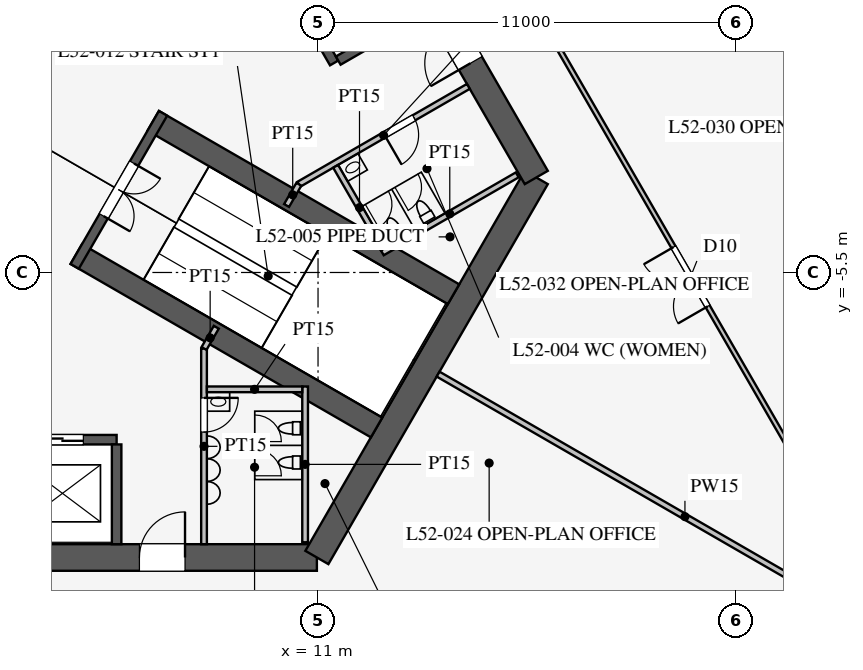
"""IFC4 building model, lengths in metres.
Left out: names, types, materials, properties, quantities, classifications, styles, units other than length and angle.
Written with IfcOpenShell. Run it as: python <this file> out.ifc"""

import sys

from ifc_helpers import new_model, si_unit, direction, frame, frame_2d, origin, place, context, subcontext, project, spatial, rectangle, extrude, element, fill, save


model = new_model("IFC4")
c1 = context("Model", 3, precision=1e-05, world=origin(), true_north=direction((0.0, 1.0)))
c2 = subcontext(c1, "Body", "Model", "MODEL_VIEW")
j1 = project(units=[si_unit("LENGTHUNIT", "METRE"), si_unit("PLANEANGLEUNIT", "RADIAN")], contexts=[c1])
p1 = place(None, origin())
s1 = spatial("IfcSite", under=j1, at=p1, CompositionType="ELEMENT")
p2 = place(p1, origin())
s2 = spatial("IfcBuilding", under=s1, at=p2, CompositionType="ELEMENT")
p3 = place(p2, frame((0.0, 0.0, 227.5)))
s3 = spatial("IfcBuildingStorey", under=s2, at=p3, CompositionType="ELEMENT", Elevation=227.5)
p4 = place(p3, frame((-10.97, -13.0, 0.0), z_axis=(0.0, 0.0, 1.0), x_axis=(1.0, 0.0, 0.0)))
e1 = element("IfcWall", 1, at=p4, inside=s3, PredefinedType="SHEAR", context=c2, shape_type="SweptSolid", body=[
    extrude(rectangle(XDim=21.939, YDim=0.7, at=frame_2d((10.97, 0.0))), origin(), (0.0, 0.0, 1.0), 4.2),
])
p5 = place(p4, frame((17.27, 0.0, 0.0)))
e2 = element("IfcOpeningElement", 2, at=p5, cuts=e1, PredefinedType="OPENING", context=c2, shape_type="SweptSolid", body=[
    extrude(rectangle(XDim=1.2, YDim=2.1, at=frame_2d((0.6, 1.05))), frame((0.0, 0.36, 0.0), z_axis=(0.0, -1.0, 0.0), x_axis=(1.0, 0.0, 0.0)), (0.0, 0.0, 1.0), 0.72),
])
p6 = place(p4, frame((3.47, 0.0, 0.0)))
e3 = element("IfcOpeningElement", 3, at=p6, cuts=e1, PredefinedType="OPENING", context=c2, shape_type="SweptSolid", body=[
    extrude(rectangle(XDim=1.2, YDim=2.1, at=frame_2d((0.6, 1.05))), frame((0.0, 0.36, 0.0), z_axis=(0.0, -1.0, 0.0), x_axis=(1.0, 0.0, 0.0)), (0.0, 0.0, 1.0), 0.72),
])
p7 = place(p3, frame((10.97, -13.0, 0.0), z_axis=(0.0, 0.0, 1.0), x_axis=(0.499995765644, 0.866027848477, 0.0)))
e4 = element("IfcWall", 4, at=p7, inside=s3, PredefinedType="SHEAR", context=c2, shape_type="SweptSolid", body=[
    extrude(rectangle(XDim=11.547, YDim=0.7, at=frame_2d((5.773, 0.0))), origin(), (0.0, 0.0, 1.0), 4.2),
])
p8 = place(p3, frame((16.743, -3.0, 0.0), z_axis=(0.0, 0.0, 1.0), x_axis=(-0.500002442456, 0.866023993627, 0.0)))
e5 = element("IfcWall", 5, at=p8, inside=s3, PredefinedType="SHEAR", context=c2, shape_type="SweptSolid", body=[
    extrude(rectangle(XDim=21.939, YDim=0.7, at=frame_2d((10.97, 0.0))), origin(), (0.0, 0.0, 1.0), 4.2),
])
p9 = place(p8, frame((17.27, 0.0, 0.0)))
e6 = element("IfcOpeningElement", 6, at=p9, cuts=e5, PredefinedType="OPENING", context=c2, shape_type="SweptSolid", body=[
    extrude(rectangle(XDim=1.2, YDim=2.1, at=frame_2d((0.6, 1.05))), frame((0.0, 0.36, 0.0), z_axis=(0.0, -1.0, 0.0), x_axis=(1.0, 0.0, 0.0)), (0.0, 0.0, 1.0), 0.72),
])
p10 = place(p8, frame((3.47, 0.0, 0.0)))
e7 = element("IfcOpeningElement", 7, at=p10, cuts=e5, PredefinedType="OPENING", context=c2, shape_type="SweptSolid", body=[
    extrude(rectangle(XDim=1.2, YDim=2.1, at=frame_2d((0.6, 1.05))), frame((0.0, 0.36, 0.0), z_axis=(0.0, -1.0, 0.0), x_axis=(1.0, 0.0, 0.0)), (0.0, 0.0, 1.0), 0.72),
])
p11 = place(p3, frame((-5.7, -9.9, 0.0), z_axis=(0.0, 0.0, 1.0), x_axis=(1.0, 0.0, 0.0)))
e8 = element("IfcWall", 8, at=p11, inside=s3, PredefinedType="SHEAR", context=c2, shape_type="SweptSolid", body=[
    extrude(rectangle(XDim=11.4, YDim=0.25, at=frame_2d((5.7, 0.0))), origin(), (0.0, 0.0, 1.0), 4.2),
])
p12 = place(p11, frame((0.875, 0.0, 0.0)))
e9 = element("IfcOpeningElement", 9, at=p12, cuts=e8, PredefinedType="OPENING", context=c2, shape_type="SweptSolid", body=[
    extrude(rectangle(XDim=1.1, YDim=2.2, at=frame_2d((0.55, 1.1))), frame((0.0, 0.135, 0.0), z_axis=(0.0, -1.0, 0.0), x_axis=(1.0, 0.0, 0.0)), (0.0, 0.0, 1.0), 0.27),
])
p13 = place(p11, frame((3.725, 0.0, 0.0)))
e10 = element("IfcOpeningElement", 10, at=p13, cuts=e8, PredefinedType="OPENING", context=c2, shape_type="SweptSolid", body=[
    extrude(rectangle(XDim=1.1, YDim=2.2, at=frame_2d((0.55, 1.1))), frame((0.0, 0.135, 0.0), z_axis=(0.0, -1.0, 0.0), x_axis=(1.0, 0.0, 0.0)), (0.0, 0.0, 1.0), 0.27),
])
p14 = place(p11, frame((6.575, 0.0, 0.0)))
e11 = element("IfcOpeningElement", 11, at=p14, cuts=e8, PredefinedType="OPENING", context=c2, shape_type="SweptSolid", body=[
    extrude(rectangle(XDim=1.1, YDim=2.2, at=frame_2d((0.55, 1.1))), frame((0.0, 0.135, 0.0), z_axis=(0.0, -1.0, 0.0), x_axis=(1.0, 0.0, 0.0)), (0.0, 0.0, 1.0), 0.27),
])
p15 = place(p11, frame((9.425, 0.0, 0.0)))
e12 = element("IfcOpeningElement", 12, at=p15, cuts=e8, PredefinedType="OPENING", context=c2, shape_type="SweptSolid", body=[
    extrude(rectangle(XDim=1.1, YDim=2.2, at=frame_2d((0.55, 1.1))), frame((0.0, 0.135, 0.0), z_axis=(0.0, -1.0, 0.0), x_axis=(1.0, 0.0, 0.0)), (0.0, 0.0, 1.0), 0.27),
])
p16 = place(p3, frame((5.7, -10.025, 0.0), z_axis=(0.0, 0.0, 1.0), x_axis=(0.0, -1.0, 0.0)))
e13 = element("IfcWall", 13, at=p16, inside=s3, PredefinedType="SHEAR", context=c2, shape_type="SweptSolid", body=[
    extrude(rectangle(XDim=2.625, YDim=0.25, at=frame_2d((1.312, 0.0))), origin(), (0.0, 0.0, 1.0), 4.2),
])
p17 = place(p3, frame((11.424, 0.014, 0.0), z_axis=(0.0, 0.0, 1.0), x_axis=(-0.500001763848, 0.866024385424, 0.0)))
e14 = element("IfcWall", 14, at=p17, inside=s3, PredefinedType="SHEAR", context=c2, shape_type="SweptSolid", body=[
    extrude(rectangle(XDim=11.4, YDim=0.25, at=frame_2d((5.7, 0.0))), origin(), (0.0, 0.0, 1.0), 4.2),
])
p18 = place(p17, frame((0.975, 0.0, 0.0)))
e15 = element("IfcOpeningElement", 15, at=p18, cuts=e14, PredefinedType="OPENING", context=c2, shape_type="SweptSolid", body=[
    extrude(rectangle(XDim=0.9, YDim=2.1, at=frame_2d((0.45, 1.05))), frame((0.0, 0.135, 0.0), z_axis=(0.0, -1.0, 0.0), x_axis=(1.0, 0.0, 0.0)), (0.0, 0.0, 1.0), 0.27),
])
p19 = place(p17, frame((3.825, 0.0, 0.0)))
e16 = element("IfcOpeningElement", 16, at=p19, cuts=e14, PredefinedType="OPENING", context=c2, shape_type="SweptSolid", body=[
    extrude(rectangle(XDim=0.9, YDim=2.1, at=frame_2d((0.45, 1.05))), frame((0.0, 0.135, 0.0), z_axis=(0.0, -1.0, 0.0), x_axis=(1.0, 0.0, 0.0)), (0.0, 0.0, 1.0), 0.27),
])
p20 = place(p17, frame((6.675, 0.0, 0.0)))
e17 = element("IfcOpeningElement", 17, at=p20, cuts=e14, PredefinedType="OPENING", context=c2, shape_type="SweptSolid", body=[
    extrude(rectangle(XDim=0.9, YDim=2.1, at=frame_2d((0.45, 1.05))), frame((0.0, 0.135, 0.0), z_axis=(0.0, -1.0, 0.0), x_axis=(1.0, 0.0, 0.0)), (0.0, 0.0, 1.0), 0.27),
])
p21 = place(p17, frame((9.525, 0.0, 0.0)))
e18 = element("IfcOpeningElement", 18, at=p21, cuts=e14, PredefinedType="OPENING", context=c2, shape_type="SweptSolid", body=[
    extrude(rectangle(XDim=0.9, YDim=2.1, at=frame_2d((0.45, 1.05))), frame((0.0, 0.135, 0.0), z_axis=(0.0, -1.0, 0.0), x_axis=(1.0, 0.0, 0.0)), (0.0, 0.0, 1.0), 0.27),
])
p22 = place(p3, frame((11.532, 0.076, 0.0), z_axis=(0.0, 0.0, 1.0), x_axis=(0.866013657776, 0.500020344131, 0.0)))
e19 = element("IfcWall", 19, at=p22, inside=s3, PredefinedType="SHEAR", context=c2, shape_type="SweptSolid", body=[
    extrude(rectangle(XDim=2.625, YDim=0.25, at=frame_2d((1.312, 0.0))), origin(), (0.0, 0.0, 1.0), 4.2),
])
for number, where, z_axis, x_axis in (
    (20, (4.638, -5.016, 0.0), (0.0, 0.0, 1.0), (0.866, -0.5, 0.0)),
    (21, (6.663, -1.509, 0.0), (0.0, 0.0, 1.0), (0.866, -0.5, 0.0)),
):
    element("IfcWall", number, at=place(p3, frame(where, z_axis=z_axis, x_axis=x_axis)), inside=s3, PredefinedType="SHEAR", context=c2, shape_type="SweptSolid", body=[
        extrude(rectangle(XDim=9.125, YDim=0.6, at=frame_2d((4.562, 0.0))), origin(), (0.0, 0.0, 1.0), 4.2),
    ])
p23 = place(p3, frame((4.597, -5.339, 0.0), z_axis=(0.0, 0.0, 1.0), x_axis=(0.499984536904, 0.866034331223, 0.0)))
e22 = element("IfcWall", 22, at=p23, inside=s3, PredefinedType="SHEAR", context=c2, shape_type="SweptSolid", body=[
    extrude(rectangle(XDim=4.65, YDim=0.25, at=frame_2d((2.325, 0.0))), origin(), (0.0, 0.0, 1.0), 4.2),
])
p24 = place(p23, frame((1.525, 0.0, 0.0)))
e23 = element("IfcOpeningElement", 23, at=p24, cuts=e22, PredefinedType="OPENING", context=c2, shape_type="SweptSolid", body=[
    extrude(rectangle(XDim=1.6, YDim=2.1, at=frame_2d((0.8, 1.05))), frame((0.0, 0.135, 0.0), z_axis=(0.0, -1.0, 0.0), x_axis=(1.0, 0.0, 0.0)), (0.0, 0.0, 1.0), 0.27),
])
p25 = place(p3, frame((8.0, -7.5, 0.0), z_axis=(0.0, 0.0, 1.0), x_axis=(0.0, -1.0, 0.0)))
e24 = element("IfcWall", 24, at=p25, inside=s3, PredefinedType="PARTITIONING", context=c2, shape_type="SweptSolid", body=[
    extrude(rectangle(XDim=5.15, YDim=0.15, at=frame_2d((2.575, 0.0))), origin(), (0.0, 0.0, 1.0), 4.0),
])
p26 = place(p25, frame((1.3, 0.0, 0.0)))
e25 = element("IfcOpeningElement", 25, at=p26, cuts=e24, PredefinedType="OPENING", context=c2, shape_type="SweptSolid", body=[
    extrude(rectangle(XDim=0.9, YDim=2.1, at=frame_2d((0.45, 1.05))), frame((0.0, 0.085, 0.0), z_axis=(0.0, -1.0, 0.0), x_axis=(1.0, 0.0, 0.0)), (0.0, 0.0, 1.0), 0.17),
])
p27 = place(p3, frame((10.495, -3.178, 0.0), z_axis=(0.0, 0.0, 1.0), x_axis=(0.866037967349, 0.499978238636, 0.0)))
e26 = element("IfcWall", 26, at=p27, inside=s3, PredefinedType="PARTITIONING", context=c2, shape_type="SweptSolid", body=[
    extrude(rectangle(XDim=5.15, YDim=0.15, at=frame_2d((2.575, 0.0))), origin(), (0.0, 0.0, 1.0), 4.0),
])
p28 = place(p27, frame((2.6, 0.0, 0.0)))
e27 = element("IfcOpeningElement", 27, at=p28, cuts=e26, PredefinedType="OPENING", context=c2, shape_type="SweptSolid", body=[
    extrude(rectangle(XDim=0.9, YDim=2.1, at=frame_2d((0.45, 1.05))), frame((0.0, 0.085, 0.0), z_axis=(0.0, -1.0, 0.0), x_axis=(1.0, 0.0, 0.0)), (0.0, 0.0, 1.0), 0.17),
])
for number, where, z_axis, x_axis in (
    (28, (8.0, -7.5, 0.0), (0.0, 0.0, 1.0), (0.5, 0.866, 0.0)),
    (29, (10.495, -3.178, 0.0), (0.0, 0.0, 1.0), (-0.5, -0.866, 0.0)),
):
    element("IfcWall", number, at=place(p3, frame(where, z_axis=z_axis, x_axis=x_axis)), inside=s3, PredefinedType="PARTITIONING", context=c2, shape_type="SweptSolid", body=[
        extrude(rectangle(XDim=0.645, YDim=0.15, at=frame_2d((0.323, 0.0))), origin(), (0.0, 0.0, 1.0), 4.0),
    ])
p29 = place(p3, frame((10.66, -8.5, 0.0), z_axis=(0.0, 0.0, 1.0), x_axis=(0.0, -1.0, 0.0)))
e30 = element("IfcWall", 30, at=p29, inside=s3, PredefinedType="PARTITIONING", context=c2, shape_type="SweptSolid", body=[
    extrude(rectangle(XDim=4.1, YDim=0.15, at=frame_2d((2.05, 0.0))), origin(), (0.0, 0.0, 1.0), 4.0),
])
p30 = place(p3, frame((8.075, -8.575, 0.0), z_axis=(0.0, 0.0, 1.0), x_axis=(1.0, 0.0, 0.0)))
e31 = element("IfcWall", 31, at=p30, inside=s3, PredefinedType="PARTITIONING", context=c2, shape_type="SweptSolid", body=[
    extrude(rectangle(XDim=2.51, YDim=0.15, at=frame_2d((1.255, 0.0))), origin(), (0.0, 0.0, 1.0), 4.0),
])
p31 = place(p3, frame((12.691, -4.982, 0.0), z_axis=(0.0, 0.0, 1.0), x_axis=(0.8660249478, 0.500000789788, 0.0)))
e32 = element("IfcWall", 32, at=p31, inside=s3, PredefinedType="PARTITIONING", context=c2, shape_type="SweptSolid", body=[
    extrude(rectangle(XDim=4.1, YDim=0.15, at=frame_2d((2.05, 0.0))), origin(), (0.0, 0.0, 1.0), 4.0),
])
p32 = place(p3, frame((11.464, -2.706, 0.0), z_axis=(0.0, 0.0, 1.0), x_axis=(0.50001992892, -0.866013897511, 0.0)))
e33 = element("IfcWall", 33, at=p32, inside=s3, PredefinedType="PARTITIONING", context=c2, shape_type="SweptSolid", body=[
    extrude(rectangle(XDim=2.51, YDim=0.15, at=frame_2d((1.255, 0.0))), origin(), (0.0, 0.0, 1.0), 4.0),
])
p33 = place(p3, frame((14.159, -8.175, 0.0), z_axis=(0.0, 0.0, 1.0), x_axis=(0.866027028085, -0.499997186618, 0.0)))
e34 = element("IfcWall", 34, at=p33, inside=s3, PredefinedType="PARTITIONING", context=c2, shape_type="SweptSolid", body=[
    extrude(rectangle(XDim=15.0, YDim=0.15, at=frame_2d((7.5, 0.0))), origin(), (0.0, 0.0, 1.0), 2.4),
])
p34 = place(p3, frame((26.328, -15.182, 0.0), z_axis=(0.0, 0.0, 1.0), x_axis=(-0.500000626146, 0.866025042278, 0.0)))
e35 = element("IfcWall", 35, at=p34, inside=s3, PredefinedType="PARTITIONING", context=c2, shape_type="SweptSolid", body=[
    extrude(rectangle(XDim=52.624, YDim=0.12, at=frame_2d((26.312, 0.0))), origin(), (0.0, 0.0, 1.0), 2.9),
])
p35 = place(p34, frame((10.15, 0.0, 0.15)))
e36 = element("IfcOpeningElement", 36, at=p35, cuts=e35, PredefinedType="OPENING", context=c2, shape_type="SweptSolid", body=[
    extrude(rectangle(XDim=1.8, YDim=2.1, at=frame_2d((0.9, 1.05))), frame((0.0, 0.07, 0.0), z_axis=(0.0, -1.0, 0.0), x_axis=(1.0, 0.0, 0.0)), (0.0, 0.0, 1.0), 0.14),
])
p36 = place(p34, frame((40.65, 0.0, 0.15)))
e37 = element("IfcOpeningElement", 37, at=p36, cuts=e35, PredefinedType="OPENING", context=c2, shape_type="SweptSolid", body=[
    extrude(rectangle(XDim=1.8, YDim=2.1, at=frame_2d((0.9, 1.05))), frame((0.0, 0.07, 0.0), z_axis=(0.0, -1.0, 0.0), x_axis=(1.0, 0.0, 0.0)), (0.0, 0.0, 1.0), 0.14),
])
p37 = place(p26, origin())
e38 = element("IfcDoor", 38, at=p37, inside=s3, OperationType="SINGLE_SWING_LEFT", PredefinedType="DOOR", context=c2, shape_type="SweptSolid", body=[
    extrude(rectangle(XDim=0.9, YDim=2.1, at=frame_2d((0.45, 1.05))), frame((0.0, 0.025, 0.0), z_axis=(0.0, -1.0, 0.0), x_axis=(1.0, 0.0, 0.0)), (0.0, 0.0, 1.0), 0.05),
])
fill(e25, e38)
p38 = place(p28, frame((0.9, 0.0, 0.0), z_axis=(0.0, 0.0, 1.0), x_axis=(-1.0, 0.0, 0.0)))
e39 = element("IfcDoor", 39, at=p38, inside=s3, OperationType="SINGLE_SWING_RIGHT", PredefinedType="DOOR", context=c2, shape_type="SweptSolid", body=[
    extrude(rectangle(XDim=0.9, YDim=2.1, at=frame_2d((0.45, 1.05))), frame((0.0, 0.025, 0.0), z_axis=(0.0, -1.0, 0.0), x_axis=(1.0, 0.0, 0.0)), (0.0, 0.0, 1.0), 0.05),
])
fill(e27, e39)
p39 = place(p24, frame((1.6, 0.0, 0.0), z_axis=(0.0, 0.0, 1.0), x_axis=(-1.0, 0.0, 0.0)))
e40 = element("IfcDoor", 40, at=p39, inside=s3, OperationType="DOUBLE_DOOR_SINGLE_SWING", PredefinedType="DOOR", context=c2, shape_type="SweptSolid", body=[
    extrude(rectangle(XDim=1.6, YDim=2.1, at=frame_2d((0.8, 1.05))), frame((0.0, 0.025, 0.0), z_axis=(0.0, -1.0, 0.0), x_axis=(1.0, 0.0, 0.0)), (0.0, 0.0, 1.0), 0.05),
])
fill(e23, e40)
p40 = place(p5, origin())
e41 = element("IfcDoor", 41, at=p40, inside=s3, OperationType="SINGLE_SWING_RIGHT", PredefinedType="DOOR", context=c2, shape_type="SweptSolid", body=[
    extrude(rectangle(XDim=1.2, YDim=2.1, at=frame_2d((0.6, 1.05))), frame((0.0, 0.025, 0.0), z_axis=(0.0, -1.0, 0.0), x_axis=(1.0, 0.0, 0.0)), (0.0, 0.0, 1.0), 0.05),
])
fill(e2, e41)
p41 = place(p10, origin())
e42 = element("IfcDoor", 42, at=p41, inside=s3, OperationType="SINGLE_SWING_LEFT", PredefinedType="DOOR", context=c2, shape_type="SweptSolid", body=[
    extrude(rectangle(XDim=1.2, YDim=2.1, at=frame_2d((0.6, 1.05))), frame((0.0, 0.025, 0.0), z_axis=(0.0, -1.0, 0.0), x_axis=(1.0, 0.0, 0.0)), (0.0, 0.0, 1.0), 0.05),
])
fill(e7, e42)
p42 = place(p35, origin())
e43 = element("IfcDoor", 43, at=p42, inside=s3, OperationType="DOUBLE_DOOR_SINGLE_SWING", PredefinedType="DOOR", context=c2, shape_type="SweptSolid", body=[
    extrude(rectangle(XDim=1.8, YDim=2.1, at=frame_2d((0.9, 1.05))), frame((0.0, 0.025, 0.0), z_axis=(0.0, -1.0, 0.0), x_axis=(1.0, 0.0, 0.0)), (0.0, 0.0, 1.0), 0.05),
])
fill(e36, e43)
p43 = place(p15, origin())
e44 = element("IfcDoor", 44, at=p43, inside=s3, OperationType="DOUBLE_DOOR_SLIDING", PredefinedType="DOOR", context=c2, shape_type="SweptSolid", body=[
    extrude(rectangle(XDim=1.1, YDim=2.2, at=frame_2d((0.55, 1.1))), frame((0.0, 0.025, 0.0), z_axis=(0.0, -1.0, 0.0), x_axis=(1.0, 0.0, 0.0)), (0.0, 0.0, 1.0), 0.05),
])
fill(e12, e44)
save(model, sys.argv[1])
